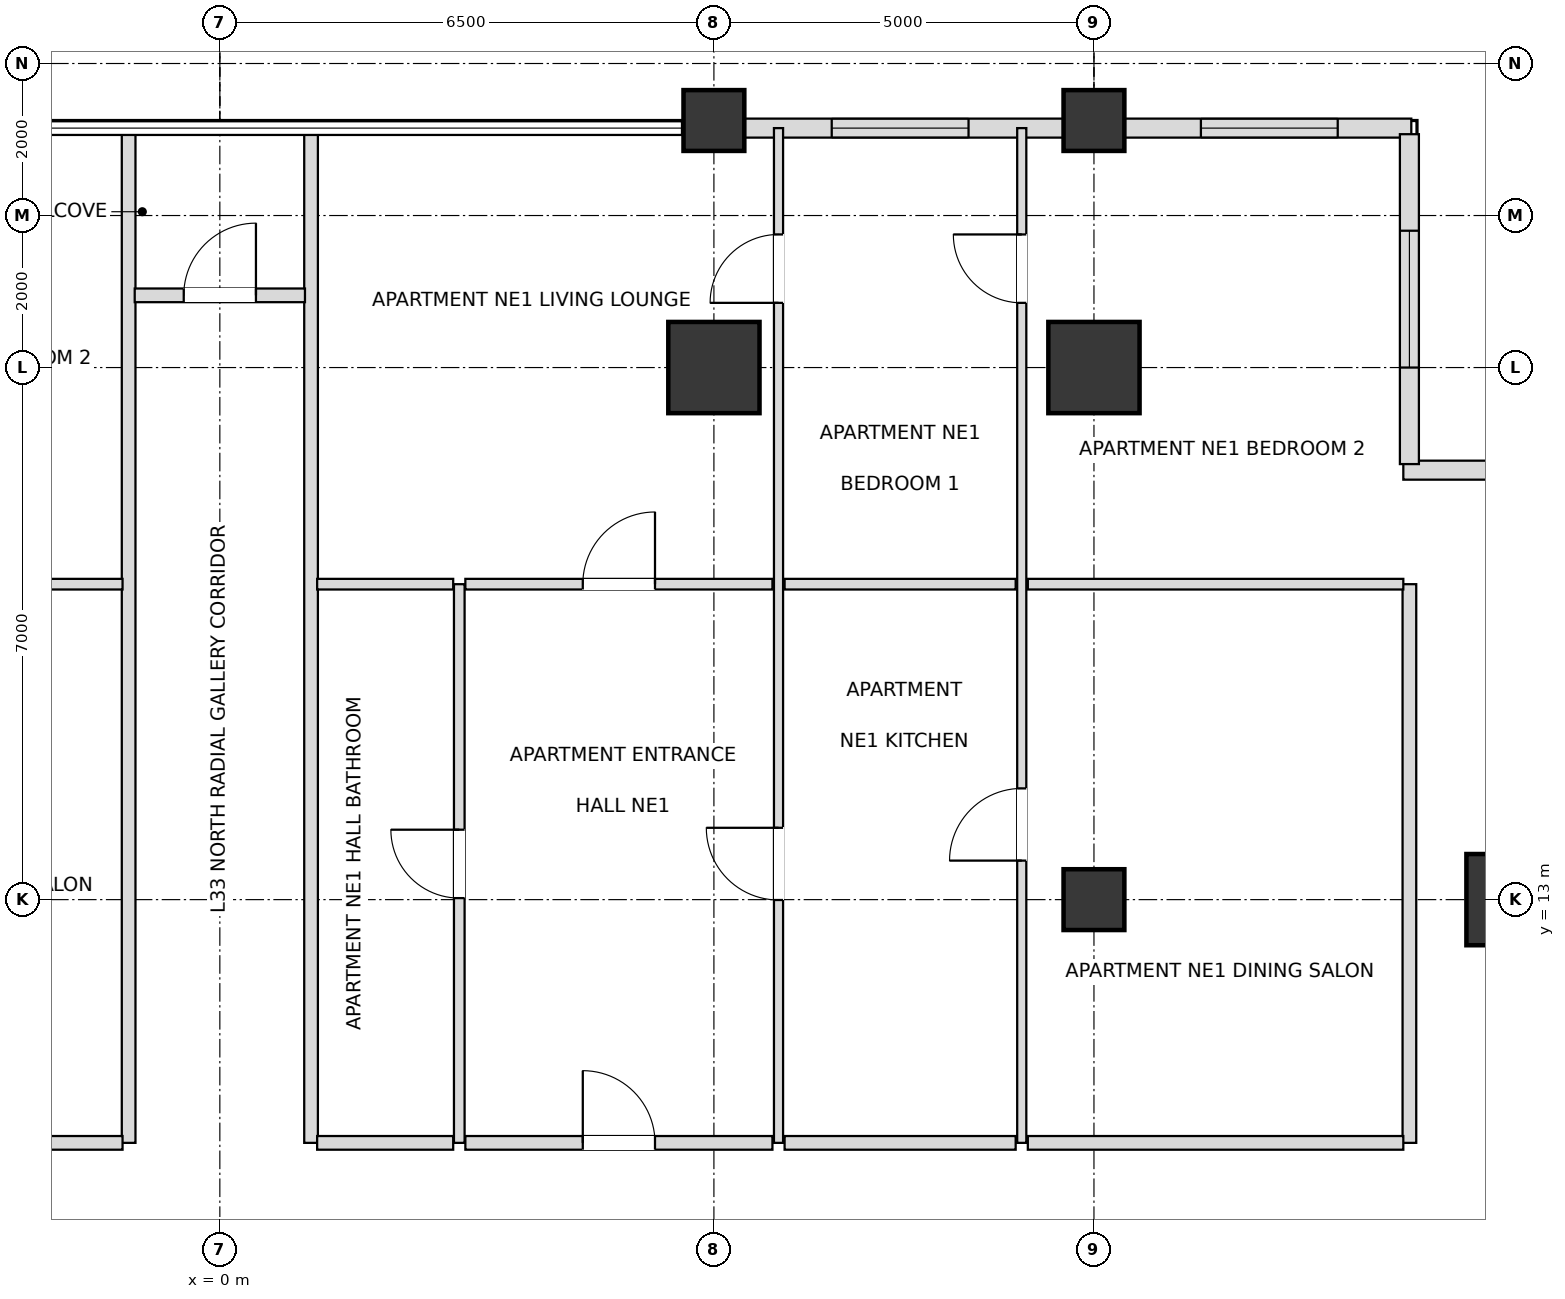
"""IFC4 building model, lengths in metres.
Left out: names, types, materials, properties, quantities, classifications, styles, units other than length and angle.
Written with IfcOpenShell. Run it as: python <this file> out.ifc"""

import sys

from ifc_helpers import new_model, si_unit, direction, frame, frame_2d, origin, origin_2d, place, context, subcontext, project, spatial, rectangle, extrude, element, fill, save


model = new_model("IFC4")
c1 = context("Model", 3, precision=1e-05, world=origin(), true_north=direction((0.0, 1.0)))
c2 = subcontext(c1, "Body", "Model", "MODEL_VIEW")
j1 = project(units=[si_unit("LENGTHUNIT", "METRE"), si_unit("PLANEANGLEUNIT", "RADIAN")], contexts=[c1])
p1 = place(None, origin())
s1 = spatial("IfcSite", under=j1, at=p1, CompositionType="ELEMENT")
p2 = place(p1, origin())
s2 = spatial("IfcBuilding", under=s1, at=p2, CompositionType="ELEMENT")
p3 = place(p2, frame((0.0, 0.0, 133.2)))
s3 = spatial("IfcBuildingStorey", under=s2, at=p3, CompositionType="ELEMENT", Elevation=133.2)
for number, where, z_axis, x_axis in (
    (1, (17.0, 13.0, 0.0), (0.0, 0.0, 1.0), (1.0, 0.0, 0.0)),
    (2, (11.5, 20.0, 0.0), (0.0, 0.0, 1.0), (1.0, 0.0, 0.0)),
    (3, (6.5, 20.0, 0.0), (0.0, 0.0, 1.0), (1.0, 0.0, 0.0)),
):
    element("IfcColumn", number, at=place(p3, frame(where, z_axis=z_axis, x_axis=x_axis)), inside=s3, PredefinedType="USERDEFINED", context=c2, shape_type="SweptSolid", body=[
        extrude(rectangle(XDim=1.2, YDim=1.2, at=origin_2d()), origin(), (0.0, 0.0, 1.0), 3.6),
    ])
for number, where, z_axis, x_axis in (
    (4, (11.5, 13.0, 0.0), (0.0, 0.0, 1.0), (1.0, 0.0, 0.0)),
    (5, (6.5, 23.25, 0.0), (0.0, 0.0, 1.0), (1.0, 0.0, 0.0)),
    (6, (11.5, 23.25, 0.0), (0.0, 0.0, 1.0), (1.0, 0.0, 0.0)),
):
    element("IfcColumn", number, at=place(p3, frame(where, z_axis=z_axis, x_axis=x_axis)), inside=s3, PredefinedType="COLUMN", context=c2, shape_type="SweptSolid", body=[
        extrude(rectangle(XDim=0.8, YDim=0.8, at=origin_2d()), origin(), (0.0, 0.0, 1.0), 3.6),
    ])
p4 = place(p3, frame((15.675, 23.15, 0.0), z_axis=(0.0, 0.0, 1.0), x_axis=(-1.0, 0.0, 0.0)))
e7 = element("IfcWall", 7, at=p4, inside=s3, PredefinedType="SOLIDWALL", context=c2, shape_type="SweptSolid", body=[
    extrude(rectangle(XDim=3.78, YDim=0.25, at=frame_2d((1.89, 0.0))), origin(), (0.0, 0.0, 1.0), 2.736),
])
p5 = place(p4, frame((0.968, 0.0, 0.72)))
e8 = element("IfcOpeningElement", 8, at=p5, cuts=e7, PredefinedType="OPENING", context=c2, shape_type="SweptSolid", body=[
    extrude(rectangle(XDim=1.8, YDim=1.68, at=frame_2d((0.9, 0.84))), frame((0.0, 0.135, 0.0), z_axis=(0.0, -1.0, 0.0), x_axis=(1.0, 0.0, 0.0)), (0.0, 0.0, 1.0), 0.27),
])
p6 = place(p3, frame((11.105, 23.15, 0.0), z_axis=(0.0, 0.0, 1.0), x_axis=(-1.0, 0.0, 0.0)))
e9 = element("IfcWall", 9, at=p6, inside=s3, PredefinedType="SOLIDWALL", context=c2, shape_type="SweptSolid", body=[
    extrude(rectangle(XDim=4.21, YDim=0.25, at=frame_2d((2.105, 0.0))), origin(), (0.0, 0.0, 1.0), 2.736),
])
p7 = place(p6, frame((1.255, 0.0, 0.72)))
e10 = element("IfcOpeningElement", 10, at=p7, cuts=e9, PredefinedType="OPENING", context=c2, shape_type="SweptSolid", body=[
    extrude(rectangle(XDim=1.8, YDim=1.68, at=frame_2d((0.9, 0.84))), frame((0.0, 0.135, 0.0), z_axis=(0.0, -1.0, 0.0), x_axis=(1.0, 0.0, 0.0)), (0.0, 0.0, 1.0), 0.27),
])
p8 = place(p3, frame((20.23, 18.65, 0.0), z_axis=(0.0, 0.0, 1.0), x_axis=(-1.0, 0.0, 0.0)))
e11 = element("IfcWall", 11, at=p8, inside=s3, PredefinedType="SOLIDWALL", context=c2, shape_type="SweptSolid", body=[
    extrude(rectangle(XDim=4.66, YDim=0.25, at=frame_2d((2.33, 0.0))), origin(), (0.0, 0.0, 1.0), 2.736),
])
p9 = place(p8, frame((1.43, 0.0, 0.72)))
e12 = element("IfcOpeningElement", 12, at=p9, cuts=e11, PredefinedType="OPENING", context=c2, shape_type="SweptSolid", body=[
    extrude(rectangle(XDim=1.8, YDim=1.68, at=frame_2d((0.9, 0.84))), frame((0.0, 0.135, 0.0), z_axis=(0.0, -1.0, 0.0), x_axis=(1.0, 0.0, 0.0)), (0.0, 0.0, 1.0), 0.27),
])
p10 = place(p3, frame((15.65, 18.73, 0.0), z_axis=(0.0, 0.0, 1.0), x_axis=(0.0, 1.0, 0.0)))
e13 = element("IfcWall", 13, at=p10, inside=s3, PredefinedType="SOLIDWALL", context=c2, shape_type="SweptSolid", body=[
    extrude(rectangle(XDim=4.34, YDim=0.25, at=frame_2d((2.17, 0.0))), origin(), (0.0, 0.0, 1.0), 2.736),
])
p11 = place(p10, frame((1.27, 0.0, 0.72)))
e14 = element("IfcOpeningElement", 14, at=p11, cuts=e13, PredefinedType="OPENING", context=c2, shape_type="SweptSolid", body=[
    extrude(rectangle(XDim=1.8, YDim=1.68, at=frame_2d((0.9, 0.84))), frame((0.0, 0.135, 0.0), z_axis=(0.0, -1.0, 0.0), x_axis=(1.0, 0.0, 0.0)), (0.0, 0.0, 1.0), 0.27),
])
for number, where, z_axis, x_axis in (
    (15, (-1.2, 9.8, 0.0), (0.0, 0.0, 1.0), (0.0, 1.0, 0.0)),
    (16, (1.2, 9.8, 0.0), (0.0, 0.0, 1.0), (0.0, 1.0, 0.0)),
):
    element("IfcWall", number, at=place(p3, frame(where, z_axis=z_axis, x_axis=x_axis)), inside=s3, PredefinedType="PARTITIONING", context=c2, shape_type="SweptSolid", body=[
        extrude(rectangle(XDim=13.35, YDim=0.18, at=frame_2d((6.675, 0.0))), origin(), (0.0, 0.0, 1.0), 2.816),
    ])
p12 = place(p3, frame((3.15, 9.8, 0.0), z_axis=(0.0, 0.0, 1.0), x_axis=(0.0, 1.0, 0.0)))
e17 = element("IfcWall", 17, at=p12, inside=s3, PredefinedType="PARTITIONING", context=c2, shape_type="SweptSolid", body=[
    extrude(rectangle(XDim=7.35, YDim=0.14, at=frame_2d((3.675, 0.0))), origin(), (0.0, 0.0, 1.0), 3.38),
])
p13 = place(p12, frame((3.22, 0.0, 0.0)))
e18 = element("IfcOpeningElement", 18, at=p13, cuts=e17, PredefinedType="OPENING", context=c2, shape_type="SweptSolid", body=[
    extrude(rectangle(XDim=0.9, YDim=2.1, at=frame_2d((0.45, 1.05))), frame((0.0, 0.08, 0.0), z_axis=(0.0, -1.0, 0.0), x_axis=(1.0, 0.0, 0.0)), (0.0, 0.0, 1.0), 0.16),
])
p14 = place(p3, frame((7.35, 9.8, 0.0), z_axis=(0.0, 0.0, 1.0), x_axis=(0.0, 1.0, 0.0)))
e19 = element("IfcWall", 19, at=p14, inside=s3, PredefinedType="PARTITIONING", context=c2, shape_type="SweptSolid", body=[
    extrude(rectangle(XDim=13.35, YDim=0.12, at=frame_2d((6.675, 0.0))), origin(), (0.0, 0.0, 1.0), 2.816),
])
p15 = place(p14, frame((3.195, 0.0, 0.0)))
e20 = element("IfcOpeningElement", 20, at=p15, cuts=e19, PredefinedType="OPENING", context=c2, shape_type="SweptSolid", body=[
    extrude(rectangle(XDim=0.95, YDim=2.1, at=frame_2d((0.475, 1.05))), frame((0.0, 0.07, 0.0), z_axis=(0.0, -1.0, 0.0), x_axis=(1.0, 0.0, 0.0)), (0.0, 0.0, 1.0), 0.14),
])
p16 = place(p14, frame((11.051, 0.0, 0.0)))
e21 = element("IfcOpeningElement", 21, at=p16, cuts=e19, PredefinedType="OPENING", context=c2, shape_type="SweptSolid", body=[
    extrude(rectangle(XDim=0.9, YDim=2.1, at=frame_2d((0.45, 1.05))), frame((0.0, 0.07, 0.0), z_axis=(0.0, -1.0, 0.0), x_axis=(1.0, 0.0, 0.0)), (0.0, 0.0, 1.0), 0.14),
])
p17 = place(p3, frame((10.55, 9.8, 0.0), z_axis=(0.0, 0.0, 1.0), x_axis=(0.0, 1.0, 0.0)))
e22 = element("IfcWall", 22, at=p17, inside=s3, PredefinedType="PARTITIONING", context=c2, shape_type="SweptSolid", body=[
    extrude(rectangle(XDim=13.35, YDim=0.12, at=frame_2d((6.675, 0.0))), origin(), (0.0, 0.0, 1.0), 2.816),
])
p18 = place(p17, frame((3.713, 0.0, 0.0)))
e23 = element("IfcOpeningElement", 23, at=p18, cuts=e22, PredefinedType="OPENING", context=c2, shape_type="SweptSolid", body=[
    extrude(rectangle(XDim=0.95, YDim=2.1, at=frame_2d((0.475, 1.05))), frame((0.0, 0.07, 0.0), z_axis=(0.0, -1.0, 0.0), x_axis=(1.0, 0.0, 0.0)), (0.0, 0.0, 1.0), 0.14),
])
p19 = place(p17, frame((11.051, 0.0, 0.0)))
e24 = element("IfcOpeningElement", 24, at=p19, cuts=e22, PredefinedType="OPENING", context=c2, shape_type="SweptSolid", body=[
    extrude(rectangle(XDim=0.9, YDim=2.1, at=frame_2d((0.45, 1.05))), frame((0.0, 0.07, 0.0), z_axis=(0.0, -1.0, 0.0), x_axis=(1.0, 0.0, 0.0)), (0.0, 0.0, 1.0), 0.14),
])
p20 = place(p3, frame((15.65, 9.8, 0.0), z_axis=(0.0, 0.0, 1.0), x_axis=(0.0, 1.0, 0.0)))
e25 = element("IfcWall", 25, at=p20, inside=s3, PredefinedType="PARTITIONING", context=c2, shape_type="SweptSolid", body=[
    extrude(rectangle(XDim=7.35, YDim=0.18, at=frame_2d((3.675, 0.0))), origin(), (0.0, 0.0, 1.0), 2.736),
])
p21 = place(p3, frame((-6.22, 9.8, 0.0), z_axis=(0.0, 0.0, 1.0), x_axis=(1.0, 0.0, 0.0)))
e26 = element("IfcWall", 26, at=p21, inside=s3, PredefinedType="PARTITIONING", context=c2, shape_type="SweptSolid", body=[
    extrude(rectangle(XDim=4.94, YDim=0.18, at=frame_2d((2.47, 0.0))), origin(), (0.0, 0.0, 1.0), 3.38),
])
p22 = place(p3, frame((1.28, 9.8, 0.0), z_axis=(0.0, 0.0, 1.0), x_axis=(1.0, 0.0, 0.0)))
e27 = element("IfcWall", 27, at=p22, inside=s3, PredefinedType="PARTITIONING", context=c2, shape_type="SweptSolid", body=[
    extrude(rectangle(XDim=1.79, YDim=0.18, at=frame_2d((0.895, 0.0))), origin(), (0.0, 0.0, 1.0), 3.38),
])
p23 = place(p3, frame((3.23, 9.8, 0.0), z_axis=(0.0, 0.0, 1.0), x_axis=(1.0, 0.0, 0.0)))
e28 = element("IfcWall", 28, at=p23, inside=s3, PredefinedType="PARTITIONING", context=c2, shape_type="SweptSolid", body=[
    extrude(rectangle(XDim=4.04, YDim=0.18, at=frame_2d((2.02, 0.0))), origin(), (0.0, 0.0, 1.0), 2.816),
])
p24 = place(p23, frame((1.545, 0.0, 0.0)))
e29 = element("IfcOpeningElement", 29, at=p24, cuts=e28, PredefinedType="OPENING", context=c2, shape_type="SweptSolid", body=[
    extrude(rectangle(XDim=0.95, YDim=2.15, at=frame_2d((0.475, 1.075))), frame((0.0, 0.1, 0.0), z_axis=(0.0, -1.0, 0.0), x_axis=(1.0, 0.0, 0.0)), (0.0, 0.0, 1.0), 0.2),
])
p25 = place(p3, frame((7.43, 9.8, 0.0), z_axis=(0.0, 0.0, 1.0), x_axis=(1.0, 0.0, 0.0)))
e30 = element("IfcWall", 30, at=p25, inside=s3, PredefinedType="PARTITIONING", context=c2, shape_type="SweptSolid", body=[
    extrude(rectangle(XDim=3.04, YDim=0.18, at=frame_2d((1.52, 0.0))), origin(), (0.0, 0.0, 1.0), 3.38),
])
p26 = place(p3, frame((10.63, 9.8, 0.0), z_axis=(0.0, 0.0, 1.0), x_axis=(1.0, 0.0, 0.0)))
e31 = element("IfcWall", 31, at=p26, inside=s3, PredefinedType="PARTITIONING", context=c2, shape_type="SweptSolid", body=[
    extrude(rectangle(XDim=4.94, YDim=0.18, at=frame_2d((2.47, 0.0))), origin(), (0.0, 0.0, 1.0), 3.38),
])
p27 = place(p3, frame((-6.22, 17.15, 0.0), z_axis=(0.0, 0.0, 1.0), x_axis=(1.0, 0.0, 0.0)))
e32 = element("IfcWall", 32, at=p27, inside=s3, PredefinedType="PARTITIONING", context=c2, shape_type="SweptSolid", body=[
    extrude(rectangle(XDim=4.94, YDim=0.14, at=frame_2d((2.47, 0.0))), origin(), (0.0, 0.0, 1.0), 3.38),
])
p28 = place(p27, frame((1.995, 0.0, 0.0)))
e33 = element("IfcOpeningElement", 33, at=p28, cuts=e32, PredefinedType="OPENING", context=c2, shape_type="SweptSolid", body=[
    extrude(rectangle(XDim=0.95, YDim=2.1, at=frame_2d((0.475, 1.05))), frame((0.0, 0.08, 0.0), z_axis=(0.0, -1.0, 0.0), x_axis=(1.0, 0.0, 0.0)), (0.0, 0.0, 1.0), 0.16),
])
p29 = place(p3, frame((1.28, 17.15, 0.0), z_axis=(0.0, 0.0, 1.0), x_axis=(1.0, 0.0, 0.0)))
e34 = element("IfcWall", 34, at=p29, inside=s3, PredefinedType="PARTITIONING", context=c2, shape_type="SweptSolid", body=[
    extrude(rectangle(XDim=1.79, YDim=0.14, at=frame_2d((0.895, 0.0))), origin(), (0.0, 0.0, 1.0), 3.38),
])
p30 = place(p3, frame((3.23, 17.15, 0.0), z_axis=(0.0, 0.0, 1.0), x_axis=(1.0, 0.0, 0.0)))
e35 = element("IfcWall", 35, at=p30, inside=s3, PredefinedType="PARTITIONING", context=c2, shape_type="SweptSolid", body=[
    extrude(rectangle(XDim=4.04, YDim=0.14, at=frame_2d((2.02, 0.0))), origin(), (0.0, 0.0, 1.0), 2.816),
])
p31 = place(p30, frame((1.545, 0.0, 0.0)))
e36 = element("IfcOpeningElement", 36, at=p31, cuts=e35, PredefinedType="OPENING", context=c2, shape_type="SweptSolid", body=[
    extrude(rectangle(XDim=0.95, YDim=2.1, at=frame_2d((0.475, 1.05))), frame((0.0, 0.08, 0.0), z_axis=(0.0, -1.0, 0.0), x_axis=(1.0, 0.0, 0.0)), (0.0, 0.0, 1.0), 0.16),
])
p32 = place(p3, frame((7.43, 17.15, 0.0), z_axis=(0.0, 0.0, 1.0), x_axis=(1.0, 0.0, 0.0)))
e37 = element("IfcWall", 37, at=p32, inside=s3, PredefinedType="PARTITIONING", context=c2, shape_type="SweptSolid", body=[
    extrude(rectangle(XDim=3.04, YDim=0.14, at=frame_2d((1.52, 0.0))), origin(), (0.0, 0.0, 1.0), 3.38),
])
p33 = place(p3, frame((10.63, 17.15, 0.0), z_axis=(0.0, 0.0, 1.0), x_axis=(1.0, 0.0, 0.0)))
e38 = element("IfcWall", 38, at=p33, inside=s3, PredefinedType="PARTITIONING", context=c2, shape_type="SweptSolid", body=[
    extrude(rectangle(XDim=4.94, YDim=0.14, at=frame_2d((2.47, 0.0))), origin(), (0.0, 0.0, 1.0), 2.736),
])
p34 = place(p3, frame((-1.12, 20.95, 0.0), z_axis=(0.0, 0.0, 1.0), x_axis=(1.0, 0.0, 0.0)))
e39 = element("IfcWall", 39, at=p34, inside=s3, PredefinedType="PARTITIONING", context=c2, shape_type="SweptSolid", body=[
    extrude(rectangle(XDim=2.24, YDim=0.18, at=frame_2d((1.12, 0.0))), origin(), (0.0, 0.0, 1.0), 3.38),
])
p35 = place(p34, frame((0.645, 0.0, 0.0)))
e40 = element("IfcOpeningElement", 40, at=p35, cuts=e39, PredefinedType="OPENING", context=c2, shape_type="SweptSolid", body=[
    extrude(rectangle(XDim=0.95, YDim=2.15, at=frame_2d((0.475, 1.075))), frame((0.0, 0.1, 0.0), z_axis=(0.0, -1.0, 0.0), x_axis=(1.0, 0.0, 0.0)), (0.0, 0.0, 1.0), 0.2),
])
p36 = place(p5, origin())
e41 = element("IfcWindow", 41, at=p36, inside=s3, PartitioningType="SINGLE_PANEL", PredefinedType="WINDOW", context=c2, shape_type="SweptSolid", body=[
    extrude(rectangle(XDim=1.8, YDim=1.68, at=frame_2d((0.9, 0.84))), frame((0.0, 0.03, 0.0), z_axis=(0.0, -1.0, 0.0), x_axis=(1.0, 0.0, 0.0)), (0.0, 0.0, 1.0), 0.06),
])
fill(e8, e41)
p37 = place(p7, origin())
e42 = element("IfcWindow", 42, at=p37, inside=s3, PartitioningType="SINGLE_PANEL", PredefinedType="WINDOW", context=c2, shape_type="SweptSolid", body=[
    extrude(rectangle(XDim=1.8, YDim=1.68, at=frame_2d((0.9, 0.84))), frame((0.0, 0.03, 0.0), z_axis=(0.0, -1.0, 0.0), x_axis=(1.0, 0.0, 0.0)), (0.0, 0.0, 1.0), 0.06),
])
fill(e10, e42)
p38 = place(p11, origin())
e43 = element("IfcWindow", 43, at=p38, inside=s3, PartitioningType="SINGLE_PANEL", PredefinedType="WINDOW", context=c2, shape_type="SweptSolid", body=[
    extrude(rectangle(XDim=1.8, YDim=1.68, at=frame_2d((0.9, 0.84))), frame((0.0, 0.03, 0.0), z_axis=(0.0, -1.0, 0.0), x_axis=(1.0, 0.0, 0.0)), (0.0, 0.0, 1.0), 0.06),
])
fill(e14, e43)
p39 = place(p35, origin())
e44 = element("IfcDoor", 44, at=p39, inside=s3, OperationType="SINGLE_SWING_RIGHT", PredefinedType="DOOR", context=c2, shape_type="SweptSolid", body=[
    extrude(rectangle(XDim=0.95, YDim=2.15, at=frame_2d((0.475, 1.075))), frame((0.0, 0.025, 0.0), z_axis=(0.0, -1.0, 0.0), x_axis=(1.0, 0.0, 0.0)), (0.0, 0.0, 1.0), 0.05),
])
fill(e40, e44)
p40 = place(p13, origin())
e45 = element("IfcDoor", 45, at=p40, inside=s3, OperationType="SINGLE_SWING_RIGHT", PredefinedType="DOOR", context=c2, shape_type="SweptSolid", body=[
    extrude(rectangle(XDim=0.9, YDim=2.1, at=frame_2d((0.45, 1.05))), frame((0.0, 0.025, 0.0), z_axis=(0.0, -1.0, 0.0), x_axis=(1.0, 0.0, 0.0)), (0.0, 0.0, 1.0), 0.05),
])
fill(e18, e45)
p41 = place(p24, origin())
e46 = element("IfcDoor", 46, at=p41, inside=s3, OperationType="SINGLE_SWING_LEFT", PredefinedType="DOOR", context=c2, shape_type="SweptSolid", body=[
    extrude(rectangle(XDim=0.95, YDim=2.15, at=frame_2d((0.475, 1.075))), frame((0.0, 0.025, 0.0), z_axis=(0.0, -1.0, 0.0), x_axis=(1.0, 0.0, 0.0)), (0.0, 0.0, 1.0), 0.05),
])
fill(e29, e46)
p42 = place(p15, origin())
e47 = element("IfcDoor", 47, at=p42, inside=s3, OperationType="SINGLE_SWING_RIGHT", PredefinedType="DOOR", context=c2, shape_type="SweptSolid", body=[
    extrude(rectangle(XDim=0.95, YDim=2.1, at=frame_2d((0.475, 1.05))), frame((0.0, 0.025, 0.0), z_axis=(0.0, -1.0, 0.0), x_axis=(1.0, 0.0, 0.0)), (0.0, 0.0, 1.0), 0.05),
])
fill(e20, e47)
p43 = place(p18, origin())
e48 = element("IfcDoor", 48, at=p43, inside=s3, OperationType="SINGLE_SWING_LEFT", PredefinedType="DOOR", context=c2, shape_type="SweptSolid", body=[
    extrude(rectangle(XDim=0.95, YDim=2.1, at=frame_2d((0.475, 1.05))), frame((0.0, 0.025, 0.0), z_axis=(0.0, -1.0, 0.0), x_axis=(1.0, 0.0, 0.0)), (0.0, 0.0, 1.0), 0.05),
])
fill(e23, e48)
p44 = place(p31, origin())
e49 = element("IfcDoor", 49, at=p44, inside=s3, OperationType="SINGLE_SWING_RIGHT", PredefinedType="DOOR", context=c2, shape_type="SweptSolid", body=[
    extrude(rectangle(XDim=0.95, YDim=2.1, at=frame_2d((0.475, 1.05))), frame((0.0, 0.025, 0.0), z_axis=(0.0, -1.0, 0.0), x_axis=(1.0, 0.0, 0.0)), (0.0, 0.0, 1.0), 0.05),
])
fill(e36, e49)
p45 = place(p16, origin())
e50 = element("IfcDoor", 50, at=p45, inside=s3, OperationType="SINGLE_SWING_LEFT", PredefinedType="DOOR", context=c2, shape_type="SweptSolid", body=[
    extrude(rectangle(XDim=0.9, YDim=2.1, at=frame_2d((0.45, 1.05))), frame((0.0, 0.025, 0.0), z_axis=(0.0, -1.0, 0.0), x_axis=(1.0, 0.0, 0.0)), (0.0, 0.0, 1.0), 0.05),
])
fill(e21, e50)
p46 = place(p19, origin())
e51 = element("IfcDoor", 51, at=p46, inside=s3, OperationType="SINGLE_SWING_RIGHT", PredefinedType="DOOR", context=c2, shape_type="SweptSolid", body=[
    extrude(rectangle(XDim=0.9, YDim=2.1, at=frame_2d((0.45, 1.05))), frame((0.0, 0.025, 0.0), z_axis=(0.0, -1.0, 0.0), x_axis=(1.0, 0.0, 0.0)), (0.0, 0.0, 1.0), 0.05),
])
fill(e24, e51)
save(model, sys.argv[1])
